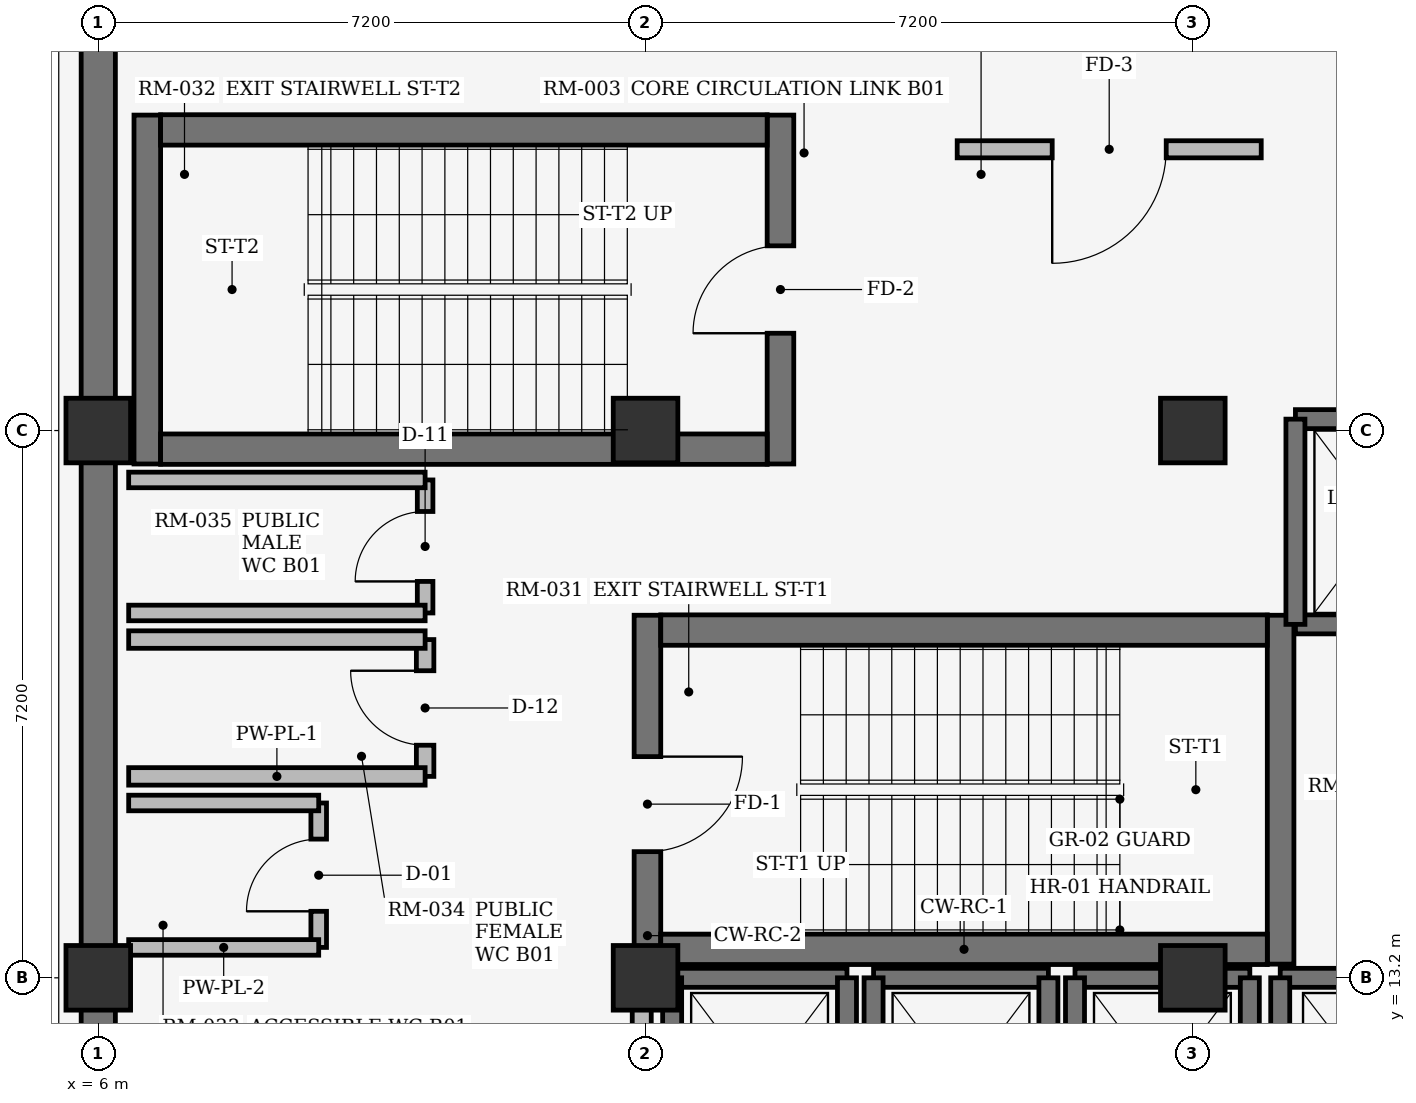
"""IFC4 building model, lengths in metres.
Left out: names, types, materials, properties, quantities, classifications, styles, units other than length and angle.
Written with IfcOpenShell. Run it as: python <this file> out.ifc"""

import sys

from ifc_helpers import new_model, si_unit, direction, frame, frame_2d, origin, origin_2d, place, context, subcontext, project, spatial, rectangle, extrude, element, fill, save


model = new_model("IFC4")
c1 = context("Model", 3, precision=1e-05, world=origin(), true_north=direction((0.0, 1.0)))
c2 = subcontext(c1, "Body", "Model", "MODEL_VIEW")
j1 = project(units=[si_unit("LENGTHUNIT", "METRE"), si_unit("PLANEANGLEUNIT", "RADIAN")], contexts=[c1])
p1 = place(None, origin())
s1 = spatial("IfcSite", under=j1, at=p1, CompositionType="ELEMENT")
p2 = place(p1, origin())
s2 = spatial("IfcBuilding", under=s1, at=p2, CompositionType="ELEMENT")
p3 = place(p2, frame((0.0, 0.0, -4.8)))
s3 = spatial("IfcBuildingStorey", under=s2, at=p3, CompositionType="ELEMENT", Elevation=-4.8)
for number, where, z_axis, x_axis in (
    (1, (6.0, 13.2, 0.0), (0.0, 0.0, 1.0), (1.0, 0.0, 0.0)),
    (2, (6.0, 20.4, 0.0), (0.0, 0.0, 1.0), (1.0, 0.0, 0.0)),
    (3, (13.2, 13.2, 0.0), (0.0, 0.0, 1.0), (1.0, 0.0, 0.0)),
    (4, (13.2, 20.4, 0.0), (0.0, 0.0, 1.0), (1.0, 0.0, 0.0)),
    (5, (20.4, 13.2, 0.0), (0.0, 0.0, 1.0), (1.0, 0.0, 0.0)),
    (6, (20.4, 20.4, 0.0), (0.0, 0.0, 1.0), (1.0, 0.0, 0.0)),
):
    element("IfcColumn", number, at=place(p3, frame(where, z_axis=z_axis, x_axis=x_axis)), inside=s3, PredefinedType="COLUMN", context=c2, shape_type="SweptSolid", body=[
        extrude(rectangle(XDim=0.85, YDim=0.85, at=origin_2d()), origin(), (0.0, 0.0, 1.0), 4.5),
    ])
p4 = place(p3, frame((6.0, 34.8, 0.0), z_axis=(0.0, 0.0, 1.0), x_axis=(0.0, -1.0, 0.0)))
e7 = element("IfcWall", 7, at=p4, inside=s3, PredefinedType="USERDEFINED", context=c2, shape_type="SweptSolid", body=[
    extrude(rectangle(XDim=28.8, YDim=0.45, at=frame_2d((14.4, 0.0))), origin(), (0.0, 0.0, 1.0), 4.5),
])
p5 = place(p3, frame((13.225, 13.0, 0.0), z_axis=(0.0, 0.0, 1.0), x_axis=(0.0, 1.0, 0.0)))
e8 = element("IfcWall", 8, at=p5, inside=s3, PredefinedType="SHEAR", context=c2, shape_type="SweptSolid", body=[
    extrude(rectangle(XDim=4.97, YDim=0.35, at=frame_2d((2.485, 0.0))), origin(), (0.0, 0.0, 1.0), 4.5),
])
p6 = place(p5, frame((1.86, 0.0, 0.0)))
e9 = element("IfcOpeningElement", 9, at=p6, cuts=e8, PredefinedType="OPENING", context=c2, shape_type="SweptSolid", body=[
    extrude(rectangle(XDim=1.25, YDim=2.2, at=frame_2d((0.625, 1.1))), frame((0.0, 0.185, 0.0), z_axis=(0.0, -1.0, 0.0), x_axis=(1.0, 0.0, 0.0)), (0.0, 0.0, 1.0), 0.37),
])
p7 = place(p3, frame((21.555, 13.38, 0.0), z_axis=(0.0, 0.0, 1.0), x_axis=(0.0, 1.0, 0.0)))
e10 = element("IfcWall", 10, at=p7, inside=s3, PredefinedType="SHEAR", context=c2, shape_type="SweptSolid", body=[
    extrude(rectangle(XDim=4.59, YDim=0.35, at=frame_2d((2.295, 0.0))), origin(), (0.0, 0.0, 1.0), 4.5),
])
for number, where, z_axis, x_axis in (
    (11, (13.4, 13.575, 0.0), (0.0, 0.0, 1.0), (1.0, 0.0, 0.0)),
    (12, (13.4, 17.775, 0.0), (0.0, 0.0, 1.0), (1.0, 0.0, 0.0)),
):
    element("IfcWall", number, at=place(p3, frame(where, z_axis=z_axis, x_axis=x_axis)), inside=s3, PredefinedType="SHEAR", context=c2, shape_type="SweptSolid", body=[
        extrude(rectangle(XDim=7.98, YDim=0.4, at=frame_2d((3.99, 0.0))), origin(), (0.0, 0.0, 1.0), 4.5),
    ])
p8 = place(p3, frame((14.975, 24.55, 0.0), z_axis=(0.0, 0.0, 1.0), x_axis=(0.0, -1.0, 0.0)))
e13 = element("IfcWall", 13, at=p8, inside=s3, PredefinedType="SHEAR", context=c2, shape_type="SweptSolid", body=[
    extrude(rectangle(XDim=4.59, YDim=0.35, at=frame_2d((2.295, 0.0))), origin(), (0.0, 0.0, 1.0), 4.5),
])
p9 = place(p8, frame((1.72, 0.0, 0.0)))
e14 = element("IfcOpeningElement", 14, at=p9, cuts=e13, PredefinedType="OPENING", context=c2, shape_type="SweptSolid", body=[
    extrude(rectangle(XDim=1.15, YDim=2.2, at=frame_2d((0.575, 1.1))), frame((0.0, 0.185, 0.0), z_axis=(0.0, -1.0, 0.0), x_axis=(1.0, 0.0, 0.0)), (0.0, 0.0, 1.0), 0.37),
])
p10 = place(p3, frame((6.645, 24.55, 0.0), z_axis=(0.0, 0.0, 1.0), x_axis=(0.0, -1.0, 0.0)))
e15 = element("IfcWall", 15, at=p10, inside=s3, PredefinedType="SHEAR", context=c2, shape_type="SweptSolid", body=[
    extrude(rectangle(XDim=4.59, YDim=0.35, at=frame_2d((2.295, 0.0))), origin(), (0.0, 0.0, 1.0), 4.5),
])
for number, where, z_axis, x_axis in (
    (16, (14.8, 24.355, 0.0), (0.0, 0.0, 1.0), (-1.0, 0.0, 0.0)),
    (17, (14.8, 20.155, 0.0), (0.0, 0.0, 1.0), (-1.0, 0.0, 0.0)),
):
    element("IfcWall", number, at=place(p3, frame(where, z_axis=z_axis, x_axis=x_axis)), inside=s3, PredefinedType="SHEAR", context=c2, shape_type="SweptSolid", body=[
        extrude(rectangle(XDim=7.98, YDim=0.4, at=frame_2d((3.99, 0.0))), origin(), (0.0, 0.0, 1.0), 4.5),
    ])
p11 = place(p3, frame((21.75, 17.85, 0.0), z_axis=(0.0, 0.0, 1.0), x_axis=(1.0, 0.0, 0.0)))
e18 = element("IfcWall", 18, at=p11, inside=s3, PredefinedType="SHEAR", context=c2, shape_type="SweptSolid", body=[
    extrude(rectangle(XDim=2.3, YDim=0.25, at=frame_2d((1.15, 0.0))), origin(), (0.0, 0.0, 1.0), 4.5),
])
p12 = place(p11, frame((0.6, 0.0, 0.0)))
e19 = element("IfcOpeningElement", 19, at=p12, cuts=e18, PredefinedType="OPENING", context=c2, shape_type="SweptSolid", body=[
    extrude(rectangle(XDim=1.1, YDim=2.2, at=frame_2d((0.55, 1.1))), frame((0.0, 0.135, 0.0), z_axis=(0.0, -1.0, 0.0), x_axis=(1.0, 0.0, 0.0)), (0.0, 0.0, 1.0), 0.27),
])
p13 = place(p3, frame((21.75, 20.55, 0.0), z_axis=(0.0, 0.0, 1.0), x_axis=(1.0, 0.0, 0.0)))
e20 = element("IfcWall", 20, at=p13, inside=s3, PredefinedType="SHEAR", context=c2, shape_type="SweptSolid", body=[
    extrude(rectangle(XDim=2.3, YDim=0.25, at=frame_2d((1.15, 0.0))), origin(), (0.0, 0.0, 1.0), 4.5),
])
p14 = place(p3, frame((21.75, 17.85, 0.0), z_axis=(0.0, 0.0, 1.0), x_axis=(0.0, 1.0, 0.0)))
e21 = element("IfcWall", 21, at=p14, inside=s3, PredefinedType="SHEAR", context=c2, shape_type="SweptSolid", body=[
    extrude(rectangle(XDim=2.7, YDim=0.25, at=frame_2d((1.35, 0.0))), origin(), (0.0, 0.0, 1.0), 4.5),
])
p15 = place(p3, frame((13.55, 13.2, 0.0), z_axis=(0.0, 0.0, 1.0), x_axis=(1.0, 0.0, 0.0)))
e22 = element("IfcWall", 22, at=p15, inside=s3, PredefinedType="SHEAR", context=c2, shape_type="SweptSolid", body=[
    extrude(rectangle(XDim=2.3, YDim=0.25, at=frame_2d((1.15, 0.0))), origin(), (0.0, 0.0, 1.0), 4.5),
])
for number, where, z_axis, x_axis in (
    (23, (13.55, 10.4, 0.0), (0.0, 0.0, 1.0), (0.0, 1.0, 0.0)),
    (24, (15.85, 10.4, 0.0), (0.0, 0.0, 1.0), (0.0, 1.0, 0.0)),
):
    element("IfcWall", number, at=place(p3, frame(where, z_axis=z_axis, x_axis=x_axis)), inside=s3, PredefinedType="SHEAR", context=c2, shape_type="SweptSolid", body=[
        extrude(rectangle(XDim=2.8, YDim=0.25, at=frame_2d((1.4, 0.0))), origin(), (0.0, 0.0, 1.0), 4.5),
    ])
p16 = place(p3, frame((16.2, 13.2, 0.0), z_axis=(0.0, 0.0, 1.0), x_axis=(1.0, 0.0, 0.0)))
e25 = element("IfcWall", 25, at=p16, inside=s3, PredefinedType="SHEAR", context=c2, shape_type="SweptSolid", body=[
    extrude(rectangle(XDim=2.3, YDim=0.25, at=frame_2d((1.15, 0.0))), origin(), (0.0, 0.0, 1.0), 4.5),
])
for number, where, z_axis, x_axis in (
    (26, (16.2, 10.4, 0.0), (0.0, 0.0, 1.0), (0.0, 1.0, 0.0)),
    (27, (18.5, 10.4, 0.0), (0.0, 0.0, 1.0), (0.0, 1.0, 0.0)),
):
    element("IfcWall", number, at=place(p3, frame(where, z_axis=z_axis, x_axis=x_axis)), inside=s3, PredefinedType="SHEAR", context=c2, shape_type="SweptSolid", body=[
        extrude(rectangle(XDim=2.8, YDim=0.25, at=frame_2d((1.4, 0.0))), origin(), (0.0, 0.0, 1.0), 4.5),
    ])
p17 = place(p3, frame((18.85, 13.2, 0.0), z_axis=(0.0, 0.0, 1.0), x_axis=(1.0, 0.0, 0.0)))
e28 = element("IfcWall", 28, at=p17, inside=s3, PredefinedType="SHEAR", context=c2, shape_type="SweptSolid", body=[
    extrude(rectangle(XDim=2.3, YDim=0.25, at=frame_2d((1.15, 0.0))), origin(), (0.0, 0.0, 1.0), 4.5),
])
for number, where, z_axis, x_axis in (
    (29, (18.85, 10.4, 0.0), (0.0, 0.0, 1.0), (0.0, 1.0, 0.0)),
    (30, (21.15, 10.4, 0.0), (0.0, 0.0, 1.0), (0.0, 1.0, 0.0)),
):
    element("IfcWall", number, at=place(p3, frame(where, z_axis=z_axis, x_axis=x_axis)), inside=s3, PredefinedType="SHEAR", context=c2, shape_type="SweptSolid", body=[
        extrude(rectangle(XDim=2.8, YDim=0.25, at=frame_2d((1.4, 0.0))), origin(), (0.0, 0.0, 1.0), 4.5),
    ])
p18 = place(p3, frame((21.55, 13.2, 0.0), z_axis=(0.0, 0.0, 1.0), x_axis=(1.0, 0.0, 0.0)))
e31 = element("IfcWall", 31, at=p18, inside=s3, PredefinedType="SHEAR", context=c2, shape_type="SweptSolid", body=[
    extrude(rectangle(XDim=2.6, YDim=0.25, at=frame_2d((1.3, 0.0))), origin(), (0.0, 0.0, 1.0), 4.5),
])
p19 = place(p3, frame((21.55, 10.2, 0.0), z_axis=(0.0, 0.0, 1.0), x_axis=(0.0, 1.0, 0.0)))
e32 = element("IfcWall", 32, at=p19, inside=s3, PredefinedType="SHEAR", context=c2, shape_type="SweptSolid", body=[
    extrude(rectangle(XDim=3.0, YDim=0.25, at=frame_2d((1.5, 0.0))), origin(), (0.0, 0.0, 1.0), 4.5),
])
p20 = place(p3, frame((8.9, 13.6, 0.0), z_axis=(0.0, 0.0, 1.0), x_axis=(0.0, 1.0, 0.0)))
e33 = element("IfcWall", 33, at=p20, inside=s3, PredefinedType="PLUMBINGWALL", context=c2, shape_type="SweptSolid", body=[
    extrude(rectangle(XDim=1.9, YDim=0.205, at=frame_2d((0.95, 0.0))), origin(), (0.0, 0.0, 1.0), 4.48),
])
p21 = place(p20, frame((0.475, 0.0, 0.0)))
e34 = element("IfcOpeningElement", 34, at=p21, cuts=e33, PredefinedType="OPENING", context=c2, shape_type="SweptSolid", body=[
    extrude(rectangle(XDim=0.95, YDim=2.15, at=frame_2d((0.475, 1.075))), frame((0.0, 0.113, 0.0), z_axis=(0.0, -1.0, 0.0), x_axis=(1.0, 0.0, 0.0)), (0.0, 0.0, 1.0), 0.225),
])
for number, where, z_axis, x_axis in (
    (35, (6.4, 13.6, 0.0), (0.0, 0.0, 1.0), (1.0, 0.0, 0.0)),
    (36, (6.4, 15.5, 0.0), (0.0, 0.0, 1.0), (1.0, 0.0, 0.0)),
):
    element("IfcWall", number, at=place(p3, frame(where, z_axis=z_axis, x_axis=x_axis)), inside=s3, PredefinedType="PLUMBINGWALL", context=c2, shape_type="SweptSolid", body=[
        extrude(rectangle(XDim=2.5, YDim=0.205, at=frame_2d((1.25, 0.0))), origin(), (0.0, 0.0, 1.0), 4.48),
    ])
p22 = place(p3, frame((10.3, 15.85, 0.0), z_axis=(0.0, 0.0, 1.0), x_axis=(0.0, 1.0, 0.0)))
e37 = element("IfcWall", 37, at=p22, inside=s3, PredefinedType="PLUMBINGWALL", context=c2, shape_type="SweptSolid", body=[
    extrude(rectangle(XDim=1.8, YDim=0.23, at=frame_2d((0.9, 0.0))), origin(), (0.0, 0.0, 1.0), 4.48),
])
p23 = place(p22, frame((0.41, 0.0, 0.0)))
e38 = element("IfcOpeningElement", 38, at=p23, cuts=e37, PredefinedType="OPENING", context=c2, shape_type="SweptSolid", body=[
    extrude(rectangle(XDim=0.98, YDim=2.1, at=frame_2d((0.49, 1.05))), frame((0.0, 0.125, 0.0), z_axis=(0.0, -1.0, 0.0), x_axis=(1.0, 0.0, 0.0)), (0.0, 0.0, 1.0), 0.25),
])
for number, where, z_axis, x_axis in (
    (39, (6.4, 15.85, 0.0), (0.0, 0.0, 1.0), (1.0, 0.0, 0.0)),
    (40, (6.4, 17.65, 0.0), (0.0, 0.0, 1.0), (1.0, 0.0, 0.0)),
):
    element("IfcWall", number, at=place(p3, frame(where, z_axis=z_axis, x_axis=x_axis)), inside=s3, PredefinedType="PLUMBINGWALL", context=c2, shape_type="SweptSolid", body=[
        extrude(rectangle(XDim=3.9, YDim=0.23, at=frame_2d((1.95, 0.0))), origin(), (0.0, 0.0, 1.0), 4.48),
    ])
p24 = place(p3, frame((10.3, 18.0, 0.0), z_axis=(0.0, 0.0, 1.0), x_axis=(0.0, 1.0, 0.0)))
e41 = element("IfcWall", 41, at=p24, inside=s3, PredefinedType="PLUMBINGWALL", context=c2, shape_type="SweptSolid", body=[
    extrude(rectangle(XDim=1.75, YDim=0.205, at=frame_2d((0.875, 0.0))), origin(), (0.0, 0.0, 1.0), 4.48),
])
p25 = place(p24, frame((0.415, 0.0, 0.0)))
e42 = element("IfcOpeningElement", 42, at=p25, cuts=e41, PredefinedType="OPENING", context=c2, shape_type="SweptSolid", body=[
    extrude(rectangle(XDim=0.92, YDim=2.1, at=frame_2d((0.46, 1.05))), frame((0.0, 0.113, 0.0), z_axis=(0.0, -1.0, 0.0), x_axis=(1.0, 0.0, 0.0)), (0.0, 0.0, 1.0), 0.225),
])
for number, where, z_axis, x_axis in (
    (43, (6.4, 18.0, 0.0), (0.0, 0.0, 1.0), (1.0, 0.0, 0.0)),
    (44, (6.4, 19.75, 0.0), (0.0, 0.0, 1.0), (1.0, 0.0, 0.0)),
):
    element("IfcWall", number, at=place(p3, frame(where, z_axis=z_axis, x_axis=x_axis)), inside=s3, PredefinedType="PLUMBINGWALL", context=c2, shape_type="SweptSolid", body=[
        extrude(rectangle(XDim=3.9, YDim=0.205, at=frame_2d((1.95, 0.0))), origin(), (0.0, 0.0, 1.0), 4.48),
    ])
p26 = place(p3, frame((13.15, 6.05, 0.0), z_axis=(0.0, 0.0, 1.0), x_axis=(0.0, 1.0, 0.0)))
e45 = element("IfcWall", 45, at=p26, inside=s3, PredefinedType="SOLIDWALL", context=c2, shape_type="SweptSolid", body=[
    extrude(rectangle(XDim=7.05, YDim=0.25, at=frame_2d((3.525, 0.0))), origin(), (0.0, 0.0, 1.0), 3.89),
])
p27 = place(p26, frame((2.625, 0.0, 0.0)))
e46 = element("IfcOpeningElement", 46, at=p27, cuts=e45, PredefinedType="OPENING", context=c2, shape_type="SweptSolid", body=[
    extrude(rectangle(XDim=1.8, YDim=2.25, at=frame_2d((0.9, 1.125))), frame((0.0, 0.135, 0.0), z_axis=(0.0, -1.0, 0.0), x_axis=(1.0, 0.0, 0.0)), (0.0, 0.0, 1.0), 0.27),
])
p28 = place(p3, frame((17.3, 24.1, 0.0), z_axis=(0.0, 0.0, 1.0), x_axis=(1.0, 0.0, 0.0)))
e47 = element("IfcWall", 47, at=p28, inside=s3, PredefinedType="SOLIDWALL", context=c2, shape_type="SweptSolid", body=[
    extrude(rectangle(XDim=4.0, YDim=0.225, at=frame_2d((2.0, 0.0))), origin(), (0.0, 0.0, 1.0), 4.48),
])
p29 = place(p28, frame((1.25, 0.0, 0.0)))
e48 = element("IfcOpeningElement", 48, at=p29, cuts=e47, PredefinedType="OPENING", context=c2, shape_type="SweptSolid", body=[
    extrude(rectangle(XDim=1.5, YDim=2.2, at=frame_2d((0.75, 1.1))), frame((0.0, 0.123, 0.0), z_axis=(0.0, -1.0, 0.0), x_axis=(1.0, 0.0, 0.0)), (0.0, 0.0, 1.0), 0.245),
])
p30 = place(p6, origin())
e49 = element("IfcDoor", 49, at=p30, inside=s3, OperationType="SINGLE_SWING_RIGHT", PredefinedType="DOOR", context=c2, shape_type="SweptSolid", body=[
    extrude(rectangle(XDim=1.25, YDim=2.2, at=frame_2d((0.625, 1.1))), frame((0.0, 0.025, 0.0), z_axis=(0.0, -1.0, 0.0), x_axis=(1.0, 0.0, 0.0)), (0.0, 0.0, 1.0), 0.05),
])
fill(e9, e49)
p31 = place(p9, origin())
e50 = element("IfcDoor", 50, at=p31, inside=s3, OperationType="SINGLE_SWING_RIGHT", PredefinedType="DOOR", context=c2, shape_type="SweptSolid", body=[
    extrude(rectangle(XDim=1.15, YDim=2.2, at=frame_2d((0.575, 1.1))), frame((0.0, 0.025, 0.0), z_axis=(0.0, -1.0, 0.0), x_axis=(1.0, 0.0, 0.0)), (0.0, 0.0, 1.0), 0.05),
])
fill(e14, e50)
p32 = place(p21, origin())
e51 = element("IfcDoor", 51, at=p32, inside=s3, OperationType="SINGLE_SWING_LEFT", PredefinedType="DOOR", context=c2, shape_type="SweptSolid", body=[
    extrude(rectangle(XDim=0.95, YDim=2.15, at=frame_2d((0.475, 1.075))), frame((0.0, 0.025, 0.0), z_axis=(0.0, -1.0, 0.0), x_axis=(1.0, 0.0, 0.0)), (0.0, 0.0, 1.0), 0.05),
])
fill(e34, e51)
p33 = place(p23, frame((0.98, 0.0, 0.0), z_axis=(0.0, 0.0, 1.0), x_axis=(-1.0, 0.0, 0.0)))
e52 = element("IfcDoor", 52, at=p33, inside=s3, OperationType="SINGLE_SWING_RIGHT", PredefinedType="DOOR", context=c2, shape_type="SweptSolid", body=[
    extrude(rectangle(XDim=0.98, YDim=2.1, at=frame_2d((0.49, 1.05))), frame((0.0, 0.025, 0.0), z_axis=(0.0, -1.0, 0.0), x_axis=(1.0, 0.0, 0.0)), (0.0, 0.0, 1.0), 0.05),
])
fill(e38, e52)
p34 = place(p25, origin())
e53 = element("IfcDoor", 53, at=p34, inside=s3, OperationType="SINGLE_SWING_LEFT", PredefinedType="DOOR", context=c2, shape_type="SweptSolid", body=[
    extrude(rectangle(XDim=0.92, YDim=2.1, at=frame_2d((0.46, 1.05))), frame((0.0, 0.025, 0.0), z_axis=(0.0, -1.0, 0.0), x_axis=(1.0, 0.0, 0.0)), (0.0, 0.0, 1.0), 0.05),
])
fill(e42, e53)
p35 = place(p29, frame((1.5, 0.0, 0.0), z_axis=(0.0, 0.0, 1.0), x_axis=(-1.0, 0.0, 0.0)))
e54 = element("IfcDoor", 54, at=p35, inside=s3, OperationType="SINGLE_SWING_LEFT", PredefinedType="DOOR", context=c2, shape_type="SweptSolid", body=[
    extrude(rectangle(XDim=1.5, YDim=2.2, at=frame_2d((0.75, 1.1))), frame((0.0, 0.025, 0.0), z_axis=(0.0, -1.0, 0.0), x_axis=(1.0, 0.0, 0.0)), (0.0, 0.0, 1.0), 0.05),
])
fill(e48, e54)
save(model, sys.argv[1])
